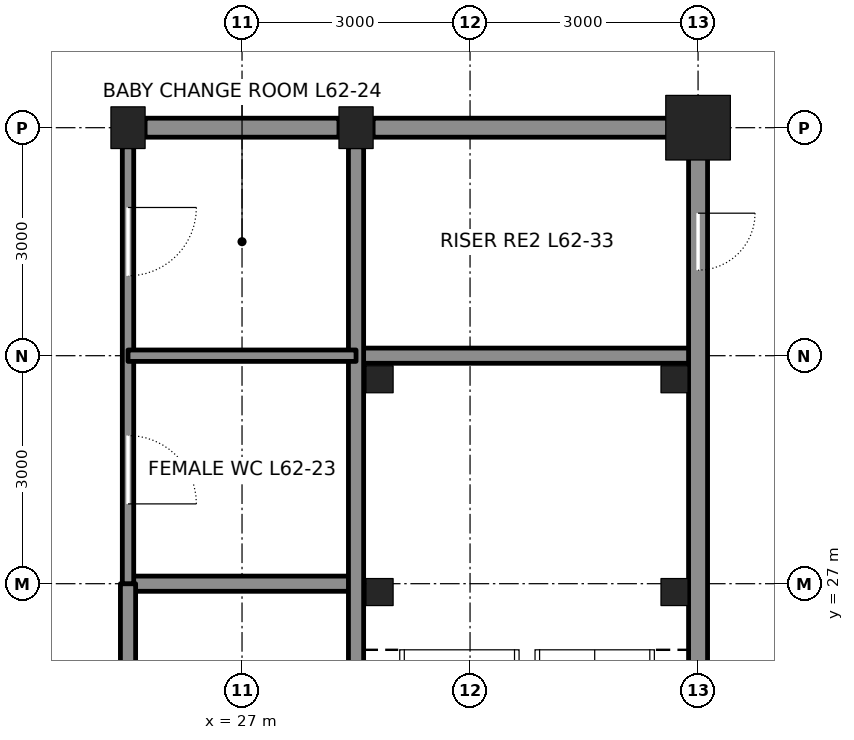
"""IFC4 building model, lengths in metres.
Left out: names, types, materials, properties, quantities, classifications, styles, units other than length and angle.
Written with IfcOpenShell. Run it as: python <this file> out.ifc"""

import sys

from ifc_helpers import new_model, si_unit, direction, frame, frame_2d, origin, origin_2d, place, context, subcontext, project, spatial, rectangle, hollow_rectangle, i_section, extrude, element, fill, save


model = new_model("IFC4")
c1 = context("Model", 3, precision=1e-05, world=origin(), true_north=direction((0.0, 1.0)))
c2 = subcontext(c1, "Body", "Model", "MODEL_VIEW")
j1 = project(units=[si_unit("LENGTHUNIT", "METRE"), si_unit("PLANEANGLEUNIT", "RADIAN")], contexts=[c1])
p1 = place(None, origin())
s1 = spatial("IfcSite", under=j1, at=p1, CompositionType="ELEMENT")
p2 = place(p1, origin())
s2 = spatial("IfcBuilding", under=s1, at=p2, CompositionType="ELEMENT")
p3 = place(p2, frame((0.0, 0.0, 279.0)))
s3 = spatial("IfcBuildingStorey", under=s2, at=p3, CompositionType="ELEMENT", Elevation=279.0)
for number, where, z_axis, x_axis in (
    (1, (25.5, 33.0, 0.0), (0.0, 0.0, 1.0), (1.0, 0.0, 0.0)),
    (2, (28.5, 33.0, 0.0), (0.0, 0.0, 1.0), (1.0, 0.0, 0.0)),
):
    element("IfcColumn", number, at=place(p3, frame(where, z_axis=z_axis, x_axis=x_axis)), inside=s3, PredefinedType="COLUMN", context=c2, shape_type="SweptSolid", body=[
        extrude(i_section(OverallWidth=0.449, OverallDepth=0.549, WebThickness=0.072, FlangeThickness=0.115, at=origin_2d()), origin(), (0.0, 0.0, 1.0), 4.2),
    ])
p4 = place(p3, frame((33.0, 33.0, 0.0), z_axis=(0.0, 0.0, 1.0), x_axis=(1.0, 0.0, 0.0)))
e3 = element("IfcColumn", 3, at=p4, inside=s3, PredefinedType="COLUMN", context=c2, shape_type="SweptSolid", body=[
    extrude(hollow_rectangle(XDim=0.85, YDim=0.85, WallThickness=0.085, at=origin_2d()), origin(), (0.0, 0.0, 1.0), 4.2),
])
p5 = place(p3, frame((25.5, 27.0, 0.0), z_axis=(0.0, 0.0, 1.0), x_axis=(1.0, 0.0, 0.0)))
e4 = element("IfcWall", 4, at=p5, inside=s3, PredefinedType="SOLIDWALL", context=c2, shape_type="SweptSolid", body=[
    extrude(rectangle(XDim=3.0, YDim=0.2, at=frame_2d((1.5, 0.0))), origin(), (0.0, 0.0, 1.0), 4.04),
])
p6 = place(p3, frame((28.5, 30.0, 0.0), z_axis=(0.0, 0.0, 1.0), x_axis=(1.0, 0.0, 0.0)))
e5 = element("IfcWall", 5, at=p6, inside=s3, PredefinedType="SOLIDWALL", context=c2, shape_type="SweptSolid", body=[
    extrude(rectangle(XDim=4.5, YDim=0.2, at=frame_2d((2.25, 0.0))), origin(), (0.0, 0.0, 1.0), 4.04),
])
p7 = place(p3, frame((25.725, 33.0, 0.0), z_axis=(0.0, 0.0, 1.0), x_axis=(1.0, 0.0, 0.0)))
e6 = element("IfcWall", 6, at=p7, inside=s3, PredefinedType="SOLIDWALL", context=c2, shape_type="SweptSolid", body=[
    extrude(rectangle(XDim=2.55, YDim=0.25, at=frame_2d((1.275, 0.0))), origin(), (0.0, 0.0, 1.0), 3.181),
])
p8 = place(p3, frame((28.725, 33.0, 0.0), z_axis=(0.0, 0.0, 1.0), x_axis=(1.0, 0.0, 0.0)))
e7 = element("IfcWall", 7, at=p8, inside=s3, PredefinedType="SOLIDWALL", context=c2, shape_type="SweptSolid", body=[
    extrude(rectangle(XDim=4.025, YDim=0.25, at=frame_2d((2.013, 0.0))), origin(), (0.0, 0.0, 1.0), 3.181),
])
p9 = place(p3, frame((25.5, 15.0, 0.0), z_axis=(0.0, 0.0, 1.0), x_axis=(0.0, 1.0, 0.0)))
e8 = element("IfcWall", 8, at=p9, inside=s3, PredefinedType="SOLIDWALL", context=c2, shape_type="SweptSolid", body=[
    extrude(rectangle(XDim=12.0, YDim=0.2, at=frame_2d((6.0, 0.0))), origin(), (0.0, 0.0, 1.0), 3.065),
])
p10 = place(p9, frame((2.55, 0.0, 0.0)))
e9 = element("IfcOpeningElement", 9, at=p10, cuts=e8, PredefinedType="OPENING", context=c2, shape_type="SweptSolid", body=[
    extrude(rectangle(XDim=0.9, YDim=2.1, at=frame_2d((0.45, 1.05))), frame((0.0, 0.11, 0.0), z_axis=(0.0, -1.0, 0.0), x_axis=(1.0, 0.0, 0.0)), (0.0, 0.0, 1.0), 0.22),
])
p11 = place(p3, frame((25.5, 27.0, 0.0), z_axis=(0.0, 0.0, 1.0), x_axis=(0.0, 1.0, 0.0)))
e10 = element("IfcWall", 10, at=p11, inside=s3, PredefinedType="PARTITIONING", context=c2, shape_type="SweptSolid", body=[
    extrude(rectangle(XDim=5.75, YDim=0.15, at=frame_2d((2.875, 0.0))), origin(), (0.0, 0.0, 1.0), 3.065),
])
p12 = place(p11, frame((1.05, 0.0, 0.0)))
e11 = element("IfcOpeningElement", 11, at=p12, cuts=e10, PredefinedType="OPENING", context=c2, shape_type="SweptSolid", body=[
    extrude(rectangle(XDim=0.9, YDim=2.1, at=frame_2d((0.45, 1.05))), frame((0.0, 0.085, 0.0), z_axis=(0.0, -1.0, 0.0), x_axis=(1.0, 0.0, 0.0)), (0.0, 0.0, 1.0), 0.17),
])
p13 = place(p11, frame((4.05, 0.0, 0.0)))
e12 = element("IfcOpeningElement", 12, at=p13, cuts=e10, PredefinedType="OPENING", context=c2, shape_type="SweptSolid", body=[
    extrude(rectangle(XDim=0.9, YDim=2.1, at=frame_2d((0.45, 1.05))), frame((0.0, 0.085, 0.0), z_axis=(0.0, -1.0, 0.0), x_axis=(1.0, 0.0, 0.0)), (0.0, 0.0, 1.0), 0.17),
])
p14 = place(p3, frame((28.5, 24.25, 0.0), z_axis=(0.0, 0.0, 1.0), x_axis=(0.0, 1.0, 0.0)))
e13 = element("IfcWall", 13, at=p14, inside=s3, PredefinedType="SOLIDWALL", context=c2, shape_type="SweptSolid", body=[
    extrude(rectangle(XDim=8.5, YDim=0.2, at=frame_2d((4.25, 0.0))), origin(), (0.0, 0.0, 1.0), 3.113),
])
p15 = place(p3, frame((33.0, 24.25, 0.0), z_axis=(0.0, 0.0, 1.0), x_axis=(0.0, 1.0, 0.0)))
e14 = element("IfcWall", 14, at=p15, inside=s3, PredefinedType="SOLIDWALL", context=c2, shape_type="SweptSolid", body=[
    extrude(rectangle(XDim=8.5, YDim=0.25, at=frame_2d((4.25, 0.0))), origin(), (0.0, 0.0, 1.0), 3.113),
])
p16 = place(p15, frame((6.875, 0.0, 0.0)))
e15 = element("IfcOpeningElement", 15, at=p16, cuts=e14, PredefinedType="OPENING", context=c2, shape_type="SweptSolid", body=[
    extrude(rectangle(XDim=0.75, YDim=2.1, at=frame_2d((0.375, 1.05))), frame((0.0, 0.135, 0.0), z_axis=(0.0, -1.0, 0.0), x_axis=(1.0, 0.0, 0.0)), (0.0, 0.0, 1.0), 0.27),
])
p17 = place(p3, frame((25.5, 30.0, 0.0), z_axis=(0.0, 0.0, 1.0), x_axis=(1.0, 0.0, 0.0)))
e16 = element("IfcWall", 16, at=p17, inside=s3, PredefinedType="PARTITIONING", context=c2, shape_type="SweptSolid", body=[
    extrude(rectangle(XDim=3.0, YDim=0.15, at=frame_2d((1.5, 0.0))), origin(), (0.0, 0.0, 1.0), 4.04),
])
for number, where, z_axis, x_axis in (
    (17, (28.81, 29.69, 0.0), (0.0, 0.0, 1.0), (1.0, 0.0, 0.0)),
    (18, (32.69, 29.69, 0.0), (0.0, 0.0, 1.0), (1.0, 0.0, 0.0)),
    (19, (28.81, 26.89, 0.0), (0.0, 0.0, 1.0), (1.0, 0.0, 0.0)),
    (20, (32.69, 26.89, 0.0), (0.0, 0.0, 1.0), (1.0, 0.0, 0.0)),
):
    element("IfcColumn", number, at=place(p3, frame(where, z_axis=z_axis, x_axis=x_axis)), inside=s3, PredefinedType="COLUMN", context=c2, shape_type="SweptSolid", body=[
        extrude(hollow_rectangle(XDim=0.356, YDim=0.356, WallThickness=0.009, at=origin_2d()), origin(), (0.0, 0.0, 1.0), 4.2),
    ])
p18 = place(p16, frame((0.75, 0.0, 0.0), z_axis=(0.0, 0.0, 1.0), x_axis=(-1.0, 0.0, 0.0)))
e21 = element("IfcDoor", 21, at=p18, inside=s3, OperationType="SINGLE_SWING_LEFT", PredefinedType="DOOR", context=c2, shape_type="SweptSolid", body=[
    extrude(rectangle(XDim=0.75, YDim=2.1, at=frame_2d((0.375, 1.05))), frame((0.0, 0.025, 0.0), z_axis=(0.0, -1.0, 0.0), x_axis=(1.0, 0.0, 0.0)), (0.0, 0.0, 1.0), 0.05),
])
fill(e15, e21)
p19 = place(p12, frame((0.9, 0.0, 0.0), z_axis=(0.0, 0.0, 1.0), x_axis=(-1.0, 0.0, 0.0)))
e22 = element("IfcDoor", 22, at=p19, inside=s3, OperationType="SINGLE_SWING_RIGHT", PredefinedType="DOOR", context=c2, shape_type="SweptSolid", body=[
    extrude(rectangle(XDim=0.9, YDim=2.1, at=frame_2d((0.45, 1.05))), frame((0.0, 0.025, 0.0), z_axis=(0.0, -1.0, 0.0), x_axis=(1.0, 0.0, 0.0)), (0.0, 0.0, 1.0), 0.05),
])
fill(e11, e22)
p20 = place(p13, frame((0.9, 0.0, 0.0), z_axis=(0.0, 0.0, 1.0), x_axis=(-1.0, 0.0, 0.0)))
e23 = element("IfcDoor", 23, at=p20, inside=s3, OperationType="SINGLE_SWING_LEFT", PredefinedType="DOOR", context=c2, shape_type="SweptSolid", body=[
    extrude(rectangle(XDim=0.9, YDim=2.1, at=frame_2d((0.45, 1.05))), frame((0.0, 0.025, 0.0), z_axis=(0.0, -1.0, 0.0), x_axis=(1.0, 0.0, 0.0)), (0.0, 0.0, 1.0), 0.05),
])
fill(e12, e23)
save(model, sys.argv[1])
